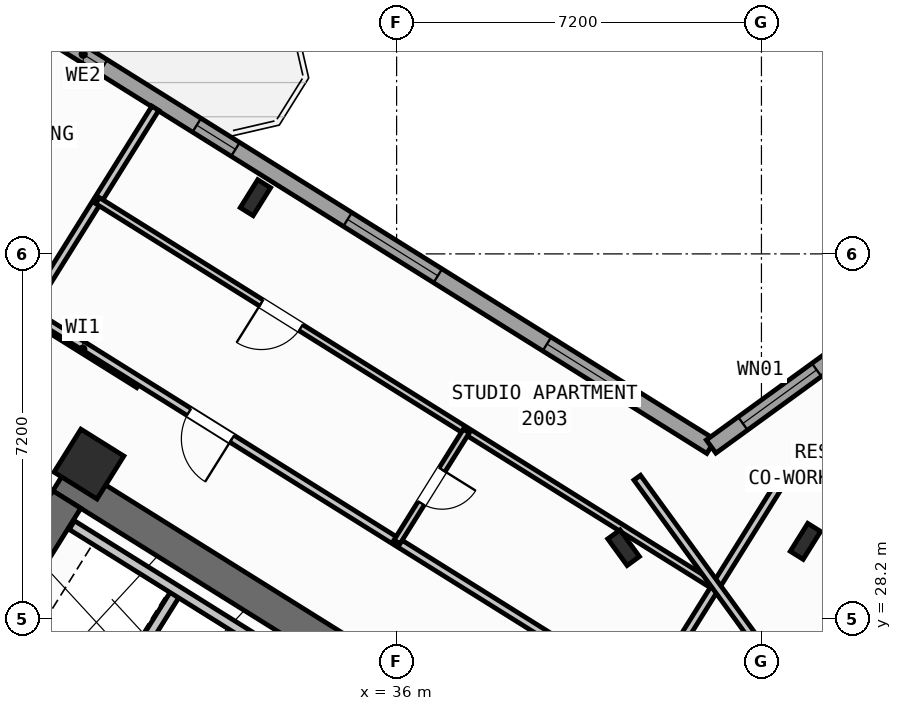
"""IFC4 building model, lengths in metres.
Left out: names, types, materials, properties, quantities, classifications, styles, units other than length and angle.
Written with IfcOpenShell. Run it as: python <this file> out.ifc"""

import sys

from ifc_helpers import new_model, si_unit, direction, frame, frame_2d, origin, origin_2d, place, context, subcontext, project, spatial, rectangle, hollow_rectangle, i_section, extrude, source, transform, mapped, element, fill, save


model = new_model("IFC4")
c1 = context("Model", 3, precision=1e-05, world=origin(), true_north=direction((0.0, 1.0)))
c2 = subcontext(c1, "Body", "Model", "MODEL_VIEW")
j1 = project(units=[si_unit("LENGTHUNIT", "METRE"), si_unit("PLANEANGLEUNIT", "RADIAN")], contexts=[c1])
p1 = place(None, origin())
s1 = spatial("IfcSite", under=j1, at=p1, CompositionType="ELEMENT")
p2 = place(p1, origin())
s2 = spatial("IfcBuilding", under=s1, at=p2, CompositionType="ELEMENT")
p3 = place(p2, frame((0.0, 0.0, 81.0)))
s3 = spatial("IfcBuildingStorey", under=s2, at=p3, CompositionType="ELEMENT", Elevation=81.0)
p4 = place(p3, frame((40.615, 23.983, 0.0), z_axis=(0.0, 0.0, 1.0), x_axis=(-0.848045953968, 0.529922692436, 0.0)))
e1 = element("IfcWall", 1, at=p4, inside=s3, PredefinedType="SHEAR", context=c2, shape_type="SweptSolid", body=[
    extrude(rectangle(XDim=13.24, YDim=0.65, at=frame_2d((6.62, 0.0))), origin(), (0.0, 0.0, 1.0), 3.32),
])
p5 = place(p3, frame((29.491, 30.552, 0.0), z_axis=(0.0, 0.0, 1.0), x_axis=(-0.529893103397, -0.8480644427, 0.0)))
e2 = element("IfcWall", 2, at=p5, inside=s3, PredefinedType="SHEAR", context=c2, shape_type="SweptSolid", body=[
    extrude(rectangle(XDim=3.525, YDim=0.65, at=frame_2d((1.763, 0.0))), origin(), (0.0, 0.0, 1.0), 3.32),
])
p6 = place(p3, frame((44.325, 24.113, 0.0), z_axis=(0.0, 0.0, 1.0), x_axis=(0.809012664862, 0.58779121131, 0.0)))
e3 = element("IfcWall", 3, at=p6, inside=s3, PredefinedType="SHEAR", context=c2, shape_type="SweptSolid", body=[
    extrude(rectangle(XDim=12.44, YDim=0.65, at=frame_2d((6.22, 0.0))), origin(), (0.0, 0.0, 1.0), 3.32),
])
m1 = source(origin(), c2, "Body", "SweptSolid", [
    extrude(i_section(OverallWidth=0.3, OverallDepth=0.65, WebThickness=0.016, FlangeThickness=0.031, at=origin_2d()), origin(), (0.0, 0.0, 1.0), 3.6),
])
for number, where, z_axis, x_axis in (
    (4, (44.068, 29.726, 0.0), (0.0, 0.0, 1.0), (-0.848, 0.53, 0.0)),
    (5, (33.213, 36.509, 0.0), (0.0, 0.0, 1.0), (-0.848, 0.53, 0.0)),
):
    element("IfcColumn", number, at=place(p3, frame(where, z_axis=z_axis, x_axis=x_axis)), inside=s3, PredefinedType="COLUMN", context=c2, shape_type="MappedRepresentation", body=[
        mapped(m1, transform((0.0, 0.0, 0.0), scale=1.0)),
    ])
m2 = source(origin(), c2, "Body", "SweptSolid", [
    extrude(hollow_rectangle(XDim=1.0, YDim=1.0, WallThickness=0.04, at=origin_2d()), origin(), (0.0, 0.0, 1.0), 3.6),
])
p7 = place(p3, frame((29.928, 31.251, 0.0), z_axis=(0.0, 0.0, 1.0), x_axis=(-0.848048096156, 0.529919264233, 0.0)))
e6 = element("IfcColumn", 6, at=p7, inside=s3, PredefinedType="COLUMN", context=c2, shape_type="MappedRepresentation", body=[
    mapped(m2, transform((0.0, 0.0, 0.0), scale=1.0)),
])
p8 = place(p3, frame((40.479, 29.601, 0.0), z_axis=(0.0, 0.0, 1.0), x_axis=(0.809016994375, 0.587785252292, 0.0)))
e7 = element("IfcColumn", 7, at=p8, inside=s3, PredefinedType="COLUMN", context=c2, shape_type="MappedRepresentation", body=[
    mapped(m1, transform((0.0, 0.0, 0.0), scale=1.0)),
])
p9 = place(p3, frame((31.76, 12.183, 0.0), z_axis=(0.0, 0.0, 1.0), x_axis=(-0.848047074256, 0.529920899612, 0.0)))
e8 = element("IfcWall", 8, at=p9, inside=s3, PredefinedType="STANDARD", context=c2, shape_type="SweptSolid", body=[
    extrude(rectangle(XDim=30.652, YDim=0.32, at=frame_2d((15.326, 0.0))), origin(), (0.0, 0.0, 1.0), 3.32),
])
p10 = place(p9, frame((14.878, 0.0, 0.0)))
e9 = element("IfcOpeningElement", 9, at=p10, cuts=e8, PredefinedType="OPENING", context=c2, shape_type="SweptSolid", body=[
    extrude(rectangle(XDim=1.2, YDim=2.15, at=frame_2d((0.6, 1.075))), frame((0.0, 0.17, 0.0), z_axis=(0.0, -1.0, 0.0), x_axis=(1.0, 0.0, 0.0)), (0.0, 0.0, 1.0), 0.34),
])
p11 = place(p9, frame((1.99, 0.0, 0.8)))
e10 = element("IfcOpeningElement", 10, at=p11, cuts=e8, PredefinedType="OPENING", context=c2, shape_type="SweptSolid", body=[
    extrude(rectangle(XDim=2.1, YDim=1.55, at=frame_2d((1.05, 0.775))), frame((0.0, 0.17, 0.0), z_axis=(0.0, -1.0, 0.0), x_axis=(1.0, 0.0, 0.0)), (0.0, 0.0, 1.0), 0.34),
])
p12 = place(p9, frame((7.169, 0.0, 0.8)))
e11 = element("IfcOpeningElement", 11, at=p12, cuts=e8, PredefinedType="OPENING", context=c2, shape_type="SweptSolid", body=[
    extrude(rectangle(XDim=2.1, YDim=1.55, at=frame_2d((1.05, 0.775))), frame((0.0, 0.17, 0.0), z_axis=(0.0, -1.0, 0.0), x_axis=(1.0, 0.0, 0.0)), (0.0, 0.0, 1.0), 0.34),
])
p13 = place(p9, frame((21.289, 0.0, 0.85)))
e12 = element("IfcOpeningElement", 12, at=p13, cuts=e8, PredefinedType="OPENING", context=c2, shape_type="SweptSolid", body=[
    extrude(rectangle(XDim=1.5, YDim=1.5, at=frame_2d((0.75, 0.75))), frame((0.0, 0.17, 0.0), z_axis=(0.0, -1.0, 0.0), x_axis=(1.0, 0.0, 0.0)), (0.0, 0.0, 1.0), 0.34),
])
p14 = place(p9, frame((25.59, 0.0, 1.0)))
e13 = element("IfcOpeningElement", 13, at=p14, cuts=e8, PredefinedType="OPENING", context=c2, shape_type="SweptSolid", body=[
    extrude(rectangle(XDim=0.9, YDim=1.25, at=frame_2d((0.45, 0.625))), frame((0.0, 0.17, 0.0), z_axis=(0.0, -1.0, 0.0), x_axis=(1.0, 0.0, 0.0)), (0.0, 0.0, 1.0), 0.34),
])
p15 = place(p9, frame((28.47, 0.0, 1.0)))
e14 = element("IfcOpeningElement", 14, at=p15, cuts=e8, PredefinedType="OPENING", context=c2, shape_type="SweptSolid", body=[
    extrude(rectangle(XDim=0.9, YDim=1.25, at=frame_2d((0.45, 0.625))), frame((0.0, 0.17, 0.0), z_axis=(0.0, -1.0, 0.0), x_axis=(1.0, 0.0, 0.0)), (0.0, 0.0, 1.0), 0.34),
])
p16 = place(p3, frame((17.424, 47.083, 0.0), z_axis=(0.0, 0.0, 1.0), x_axis=(0.848049927979, -0.529916332693, 0.0)))
e15 = element("IfcWall", 15, at=p16, inside=s3, PredefinedType="STANDARD", context=c2, shape_type="SweptSolid", body=[
    extrude(rectangle(XDim=29.223, YDim=0.32, at=frame_2d((14.612, 0.0))), origin(), (0.0, 0.0, 1.0), 3.32),
])
p17 = place(p16, frame((3.709, 0.0, 0.0)))
e16 = element("IfcOpeningElement", 16, at=p17, cuts=e15, PredefinedType="OPENING", context=c2, shape_type="SweptSolid", body=[
    extrude(rectangle(XDim=1.05, YDim=2.15, at=frame_2d((0.525, 1.075))), frame((0.0, 0.17, 0.0), z_axis=(0.0, -1.0, 0.0), x_axis=(1.0, 0.0, 0.0)), (0.0, 0.0, 1.0), 0.34),
])
p18 = place(p16, frame((0.659, 0.0, 0.95)))
e17 = element("IfcOpeningElement", 17, at=p18, cuts=e15, PredefinedType="OPENING", context=c2, shape_type="SweptSolid", body=[
    extrude(rectangle(XDim=1.2, YDim=1.4, at=frame_2d((0.6, 0.7))), frame((0.0, 0.17, 0.0), z_axis=(0.0, -1.0, 0.0), x_axis=(1.0, 0.0, 0.0)), (0.0, 0.0, 1.0), 0.34),
])
p19 = place(p16, frame((7.369, 0.0, 0.85)))
e18 = element("IfcOpeningElement", 18, at=p19, cuts=e15, PredefinedType="OPENING", context=c2, shape_type="SweptSolid", body=[
    extrude(rectangle(XDim=1.8, YDim=1.5, at=frame_2d((0.9, 0.75))), frame((0.0, 0.17, 0.0), z_axis=(0.0, -1.0, 0.0), x_axis=(1.0, 0.0, 0.0)), (0.0, 0.0, 1.0), 0.34),
])
p20 = place(p16, frame((11.009, 0.0, 1.0)))
e19 = element("IfcOpeningElement", 19, at=p20, cuts=e15, PredefinedType="OPENING", context=c2, shape_type="SweptSolid", body=[
    extrude(rectangle(XDim=0.9, YDim=1.25, at=frame_2d((0.45, 0.625))), frame((0.0, 0.17, 0.0), z_axis=(0.0, -1.0, 0.0), x_axis=(1.0, 0.0, 0.0)), (0.0, 0.0, 1.0), 0.34),
])
p21 = place(p16, frame((13.874, 0.0, 0.95)))
e20 = element("IfcOpeningElement", 20, at=p21, cuts=e15, PredefinedType="OPENING", context=c2, shape_type="SweptSolid", body=[
    extrude(rectangle(XDim=1.2, YDim=1.4, at=frame_2d((0.6, 0.7))), frame((0.0, 0.17, 0.0), z_axis=(0.0, -1.0, 0.0), x_axis=(1.0, 0.0, 0.0)), (0.0, 0.0, 1.0), 0.34),
])
p22 = place(p16, frame((17.254, 0.0, 1.0)))
e21 = element("IfcOpeningElement", 21, at=p22, cuts=e15, PredefinedType="OPENING", context=c2, shape_type="SweptSolid", body=[
    extrude(rectangle(XDim=0.9, YDim=1.25, at=frame_2d((0.45, 0.625))), frame((0.0, 0.17, 0.0), z_axis=(0.0, -1.0, 0.0), x_axis=(1.0, 0.0, 0.0)), (0.0, 0.0, 1.0), 0.34),
])
p23 = place(p16, frame((20.764, 0.0, 0.8)))
e22 = element("IfcOpeningElement", 22, at=p23, cuts=e15, PredefinedType="OPENING", context=c2, shape_type="SweptSolid", body=[
    extrude(rectangle(XDim=2.1, YDim=1.55, at=frame_2d((1.05, 0.775))), frame((0.0, 0.17, 0.0), z_axis=(0.0, -1.0, 0.0), x_axis=(1.0, 0.0, 0.0)), (0.0, 0.0, 1.0), 0.34),
])
p24 = place(p16, frame((25.403, 0.0, 0.8)))
e23 = element("IfcOpeningElement", 23, at=p24, cuts=e15, PredefinedType="OPENING", context=c2, shape_type="SweptSolid", body=[
    extrude(rectangle(XDim=2.1, YDim=1.55, at=frame_2d((1.05, 0.775))), frame((0.0, 0.17, 0.0), z_axis=(0.0, -1.0, 0.0), x_axis=(1.0, 0.0, 0.0)), (0.0, 0.0, 1.0), 0.34),
])
p25 = place(p3, frame((42.207, 31.597, 0.0), z_axis=(0.0, 0.0, 1.0), x_axis=(0.809020333377, 0.587780656523, 0.0)))
e24 = element("IfcWall", 24, at=p25, inside=s3, PredefinedType="STANDARD", context=c2, shape_type="SweptSolid", body=[
    extrude(rectangle(XDim=15.223, YDim=0.32, at=frame_2d((7.611, 0.0))), origin(), (0.0, 0.0, 1.0), 3.32),
])
p26 = place(p25, frame((12.82, 0.0, 0.0)))
e25 = element("IfcOpeningElement", 25, at=p26, cuts=e24, PredefinedType="OPENING", context=c2, shape_type="SweptSolid", body=[
    extrude(rectangle(XDim=1.05, YDim=2.15, at=frame_2d((0.525, 1.075))), frame((0.0, 0.17, 0.0), z_axis=(0.0, -1.0, 0.0), x_axis=(1.0, 0.0, 0.0)), (0.0, 0.0, 1.0), 0.34),
])
p27 = place(p25, frame((0.775, 0.0, 0.85)))
e26 = element("IfcOpeningElement", 26, at=p27, cuts=e24, PredefinedType="OPENING", context=c2, shape_type="SweptSolid", body=[
    extrude(rectangle(XDim=1.8, YDim=1.5, at=frame_2d((0.9, 0.75))), frame((0.0, 0.17, 0.0), z_axis=(0.0, -1.0, 0.0), x_axis=(1.0, 0.0, 0.0)), (0.0, 0.0, 1.0), 0.34),
])
p28 = place(p25, frame((5.544, 0.0, 0.85)))
e27 = element("IfcOpeningElement", 27, at=p28, cuts=e24, PredefinedType="OPENING", context=c2, shape_type="SweptSolid", body=[
    extrude(rectangle(XDim=1.8, YDim=1.5, at=frame_2d((0.9, 0.75))), frame((0.0, 0.17, 0.0), z_axis=(0.0, -1.0, 0.0), x_axis=(1.0, 0.0, 0.0)), (0.0, 0.0, 1.0), 0.34),
])
p29 = place(p25, frame((10.219, 0.0, 1.0)))
e28 = element("IfcOpeningElement", 28, at=p29, cuts=e24, PredefinedType="OPENING", context=c2, shape_type="SweptSolid", body=[
    extrude(rectangle(XDim=0.9, YDim=1.25, at=frame_2d((0.45, 0.625))), frame((0.0, 0.17, 0.0), z_axis=(0.0, -1.0, 0.0), x_axis=(1.0, 0.0, 0.0)), (0.0, 0.0, 1.0), 0.34),
])
p30 = place(p3, frame((31.645, 28.716, 0.0), z_axis=(0.0, 0.0, 1.0), x_axis=(-0.52986693015, -0.848080795876, 0.0)))
e29 = element("IfcWall", 29, at=p30, inside=s3, PredefinedType="STANDARD", context=c2, shape_type="SweptSolid", body=[
    extrude(rectangle(XDim=2.66, YDim=0.2, at=frame_2d((1.33, 0.0))), origin(), (0.0, 0.0, 1.0), 3.31),
])
p31 = place(p3, frame((33.363, 27.69, 0.0), z_axis=(0.0, 0.0, 1.0), x_axis=(-0.848053806312, 0.529910125964, 0.0)))
e30 = element("IfcWall", 30, at=p31, inside=s3, PredefinedType="STANDARD", context=c2, shape_type="SweptSolid", body=[
    extrude(rectangle(XDim=4.448, YDim=0.2, at=frame_2d((2.224, 0.0))), origin(), (0.0, 0.0, 1.0), 3.31),
])
p32 = place(p3, frame((30.914, 32.829, 0.0), z_axis=(0.0, 0.0, 1.0), x_axis=(-0.848008813643, 0.529982124211, 0.0)))
e31 = element("IfcWall", 31, at=p32, inside=s3, PredefinedType="PARTITIONING", context=c2, shape_type="SweptSolid", body=[
    extrude(rectangle(XDim=2.61, YDim=0.16, at=frame_2d((1.305, 0.0))), origin(), (0.0, 0.0, 1.0), 3.31),
])
p33 = place(p3, frame((31.239, 38.274, 0.0), z_axis=(0.0, 0.0, 1.0), x_axis=(-0.529914125013, -0.848051307476, 0.0)))
e32 = element("IfcWall", 32, at=p33, inside=s3, PredefinedType="PARTITIONING", context=c2, shape_type="SweptSolid", body=[
    extrude(rectangle(XDim=10.35, YDim=0.16, at=frame_2d((5.175, 0.0))), origin(), (0.0, 0.0, 1.0), 3.31),
])
p34 = place(p3, frame((41.936, 26.012, 0.0), z_axis=(0.0, 0.0, 1.0), x_axis=(-0.848051154596, 0.529914369676, 0.0)))
e33 = element("IfcWall", 33, at=p34, inside=s3, PredefinedType="PARTITIONING", context=c2, shape_type="SweptSolid", body=[
    extrude(rectangle(XDim=15.57, YDim=0.16, at=frame_2d((7.785, 0.0))), origin(), (0.0, 0.0, 1.0), 3.31),
])
p35 = place(p34, frame((10.83, 0.0, 0.0)))
e34 = element("IfcOpeningElement", 34, at=p35, cuts=e33, PredefinedType="OPENING", context=c2, shape_type="SweptSolid", body=[
    extrude(rectangle(XDim=1.0, YDim=2.1, at=frame_2d((0.5, 1.05))), frame((0.0, 0.09, 0.0), z_axis=(0.0, -1.0, 0.0), x_axis=(1.0, 0.0, 0.0)), (0.0, 0.0, 1.0), 0.18),
])
p36 = place(p3, frame((43.704, 31.086, 0.0), z_axis=(0.0, 0.0, 1.0), x_axis=(-0.529906828443, -0.848055866774, 0.0)))
e35 = element("IfcWall", 35, at=p36, inside=s3, PredefinedType="PARTITIONING", context=c2, shape_type="SweptSolid", body=[
    extrude(rectangle(XDim=5.48, YDim=0.16, at=frame_2d((2.74, 0.0))), origin(), (0.0, 0.0, 1.0), 3.31),
])
p37 = place(p3, frame((42.226, 28.873, 0.0), z_axis=(0.0, 0.0, 1.0), x_axis=(-0.848049134363, 0.529917602752, 0.0)))
e36 = element("IfcWall", 36, at=p37, inside=s3, PredefinedType="PLUMBINGWALL", context=c2, shape_type="SweptSolid", body=[
    extrude(rectangle(XDim=14.3, YDim=0.14, at=frame_2d((7.15, 0.0))), origin(), (0.0, 0.0, 1.0), 3.31),
])
p38 = place(p37, frame((9.57, 0.0, 0.0)))
e37 = element("IfcOpeningElement", 37, at=p38, cuts=e36, PredefinedType="OPENING", context=c2, shape_type="SweptSolid", body=[
    extrude(rectangle(XDim=0.92, YDim=2.08, at=frame_2d((0.46, 1.04))), frame((0.0, 0.08, 0.0), z_axis=(0.0, -1.0, 0.0), x_axis=(1.0, 0.0, 0.0)), (0.0, 0.0, 1.0), 0.16),
])
p39 = place(p3, frame((37.375, 31.904, 0.0), z_axis=(0.0, 0.0, 1.0), x_axis=(-0.529913878929, -0.848051461244, 0.0)))
e38 = element("IfcWall", 38, at=p39, inside=s3, PredefinedType="PLUMBINGWALL", context=c2, shape_type="SweptSolid", body=[
    extrude(rectangle(XDim=2.58, YDim=0.14, at=frame_2d((1.29, 0.0))), origin(), (0.0, 0.0, 1.0), 3.31),
])
p40 = place(p39, frame((0.9, 0.0, 0.0)))
e39 = element("IfcOpeningElement", 39, at=p40, cuts=e38, PredefinedType="OPENING", context=c2, shape_type="SweptSolid", body=[
    extrude(rectangle(XDim=0.78, YDim=2.05, at=frame_2d((0.39, 1.025))), frame((0.0, 0.08, 0.0), z_axis=(0.0, -1.0, 0.0), x_axis=(1.0, 0.0, 0.0)), (0.0, 0.0, 1.0), 0.16),
])
p41 = place(p3, frame((42.866, 26.044, 0.0), z_axis=(0.0, 0.0, 1.0), x_axis=(0.809020254154, 0.587780765566, 0.0)))
e40 = element("IfcWall", 40, at=p41, inside=s3, PredefinedType="PARTITIONING", context=c2, shape_type="SweptSolid", body=[
    extrude(rectangle(XDim=14.67, YDim=0.16, at=frame_2d((7.335, 0.0))), origin(), (0.0, 0.0, 1.0), 3.31),
])
p42 = place(p41, frame((3.215, 0.0, 0.0)))
e41 = element("IfcOpeningElement", 41, at=p42, cuts=e40, PredefinedType="OPENING", context=c2, shape_type="SweptSolid", body=[
    extrude(rectangle(XDim=1.0, YDim=2.1, at=frame_2d((0.5, 1.05))), frame((0.0, 0.09, 0.0), z_axis=(0.0, -1.0, 0.0), x_axis=(1.0, 0.0, 0.0)), (0.0, 0.0, 1.0), 0.18),
])
p43 = place(p41, frame((9.915, 0.0, 0.0)))
e42 = element("IfcOpeningElement", 42, at=p43, cuts=e40, PredefinedType="OPENING", context=c2, shape_type="SweptSolid", body=[
    extrude(rectangle(XDim=1.0, YDim=2.1, at=frame_2d((0.5, 1.05))), frame((0.0, 0.09, 0.0), z_axis=(0.0, -1.0, 0.0), x_axis=(1.0, 0.0, 0.0)), (0.0, 0.0, 1.0), 0.18),
])
p44 = place(p3, frame((43.969, 26.55, 0.0), z_axis=(0.0, 0.0, 1.0), x_axis=(-0.587776919386, 0.80902304852, 0.0)))
e43 = element("IfcWall", 43, at=p44, inside=s3, PredefinedType="PARTITIONING", context=c2, shape_type="SweptSolid", body=[
    extrude(rectangle(XDim=5.48, YDim=0.16, at=frame_2d((2.74, 0.0))), origin(), (0.0, 0.0, 1.0), 3.31),
])
m3 = source(origin(), c2, "Body", "SweptSolid", [
    extrude(rectangle(XDim=1.2, YDim=1.4, at=frame_2d((0.6, 0.7))), frame((0.0, 0.03, 0.0), z_axis=(0.0, -1.0, 0.0), x_axis=(1.0, 0.0, 0.0)), (0.0, 0.0, 1.0), 0.06),
])
p45 = place(p21, origin())
e44 = element("IfcWindow", 44, at=p45, inside=s3, PartitioningType="SINGLE_PANEL", PredefinedType="WINDOW", context=c2, shape_type="MappedRepresentation", body=[
    mapped(m3, transform((0.0, 0.0, 0.0), scale=1.0)),
])
fill(e20, e44)
m4 = source(origin(), c2, "Body", "SweptSolid", [
    extrude(rectangle(XDim=0.9, YDim=1.25, at=frame_2d((0.45, 0.625))), frame((0.0, 0.03, 0.0), z_axis=(0.0, -1.0, 0.0), x_axis=(1.0, 0.0, 0.0)), (0.0, 0.0, 1.0), 0.06),
])
p46 = place(p22, origin())
e45 = element("IfcWindow", 45, at=p46, inside=s3, PartitioningType="SINGLE_PANEL", PredefinedType="WINDOW", context=c2, shape_type="MappedRepresentation", body=[
    mapped(m4, transform((0.0, 0.0, 0.0), scale=1.0)),
])
fill(e21, e45)
m5 = source(origin(), c2, "Body", "SweptSolid", [
    extrude(rectangle(XDim=2.1, YDim=1.55, at=frame_2d((1.05, 0.775))), frame((0.0, 0.03, 0.0), z_axis=(0.0, -1.0, 0.0), x_axis=(1.0, 0.0, 0.0)), (0.0, 0.0, 1.0), 0.06),
])
p47 = place(p23, origin())
e46 = element("IfcWindow", 46, at=p47, inside=s3, PartitioningType="SINGLE_PANEL", PredefinedType="WINDOW", context=c2, shape_type="MappedRepresentation", body=[
    mapped(m5, transform((0.0, 0.0, 0.0), scale=1.0)),
])
fill(e22, e46)
p48 = place(p24, origin())
e47 = element("IfcWindow", 47, at=p48, inside=s3, PartitioningType="SINGLE_PANEL", PredefinedType="WINDOW", context=c2, shape_type="MappedRepresentation", body=[
    mapped(m5, transform((0.0, 0.0, 0.0), scale=1.0)),
])
fill(e23, e47)
m6 = source(origin(), c2, "Body", "SweptSolid", [
    extrude(rectangle(XDim=1.8, YDim=1.5, at=frame_2d((0.9, 0.75))), frame((0.0, 0.03, 0.0), z_axis=(0.0, -1.0, 0.0), x_axis=(1.0, 0.0, 0.0)), (0.0, 0.0, 1.0), 0.06),
])
p49 = place(p27, origin())
e48 = element("IfcWindow", 48, at=p49, inside=s3, PartitioningType="SINGLE_PANEL", PredefinedType="WINDOW", context=c2, shape_type="MappedRepresentation", body=[
    mapped(m6, transform((0.0, 0.0, 0.0), scale=1.0)),
])
fill(e26, e48)
m7 = source(origin(), c2, "Body", "SweptSolid", [
    extrude(rectangle(XDim=1.0, YDim=2.1, at=frame_2d((0.5, 1.05))), frame((0.0, 0.025, 0.0), z_axis=(0.0, -1.0, 0.0), x_axis=(1.0, 0.0, 0.0)), (0.0, 0.0, 1.0), 0.05),
])
p50 = place(p35, origin())
e49 = element("IfcDoor", 49, at=p50, inside=s3, OperationType="SINGLE_SWING_LEFT", PredefinedType="DOOR", context=c2, shape_type="MappedRepresentation", body=[
    mapped(m7, transform((0.0, 0.0, 0.0), scale=1.0)),
])
fill(e34, e49)
m8 = source(origin(), c2, "Body", "SweptSolid", [
    extrude(rectangle(XDim=0.92, YDim=2.08, at=frame_2d((0.46, 1.04))), frame((0.0, 0.025, 0.0), z_axis=(0.0, -1.0, 0.0), x_axis=(1.0, 0.0, 0.0)), (0.0, 0.0, 1.0), 0.05),
])
p51 = place(p38, origin())
e50 = element("IfcDoor", 50, at=p51, inside=s3, OperationType="SINGLE_SWING_RIGHT", PredefinedType="DOOR", context=c2, shape_type="MappedRepresentation", body=[
    mapped(m8, transform((0.0, 0.0, 0.0), scale=1.0)),
])
fill(e37, e50)
m9 = source(origin(), c2, "Body", "SweptSolid", [
    extrude(rectangle(XDim=0.78, YDim=2.05, at=frame_2d((0.39, 1.025))), frame((0.0, 0.025, 0.0), z_axis=(0.0, -1.0, 0.0), x_axis=(1.0, 0.0, 0.0)), (0.0, 0.0, 1.0), 0.05),
])
p52 = place(p40, origin())
e51 = element("IfcDoor", 51, at=p52, inside=s3, OperationType="SINGLE_SWING_LEFT", PredefinedType="DOOR", context=c2, shape_type="MappedRepresentation", body=[
    mapped(m9, transform((0.0, 0.0, 0.0), scale=1.0)),
])
fill(e39, e51)
save(model, sys.argv[1])
